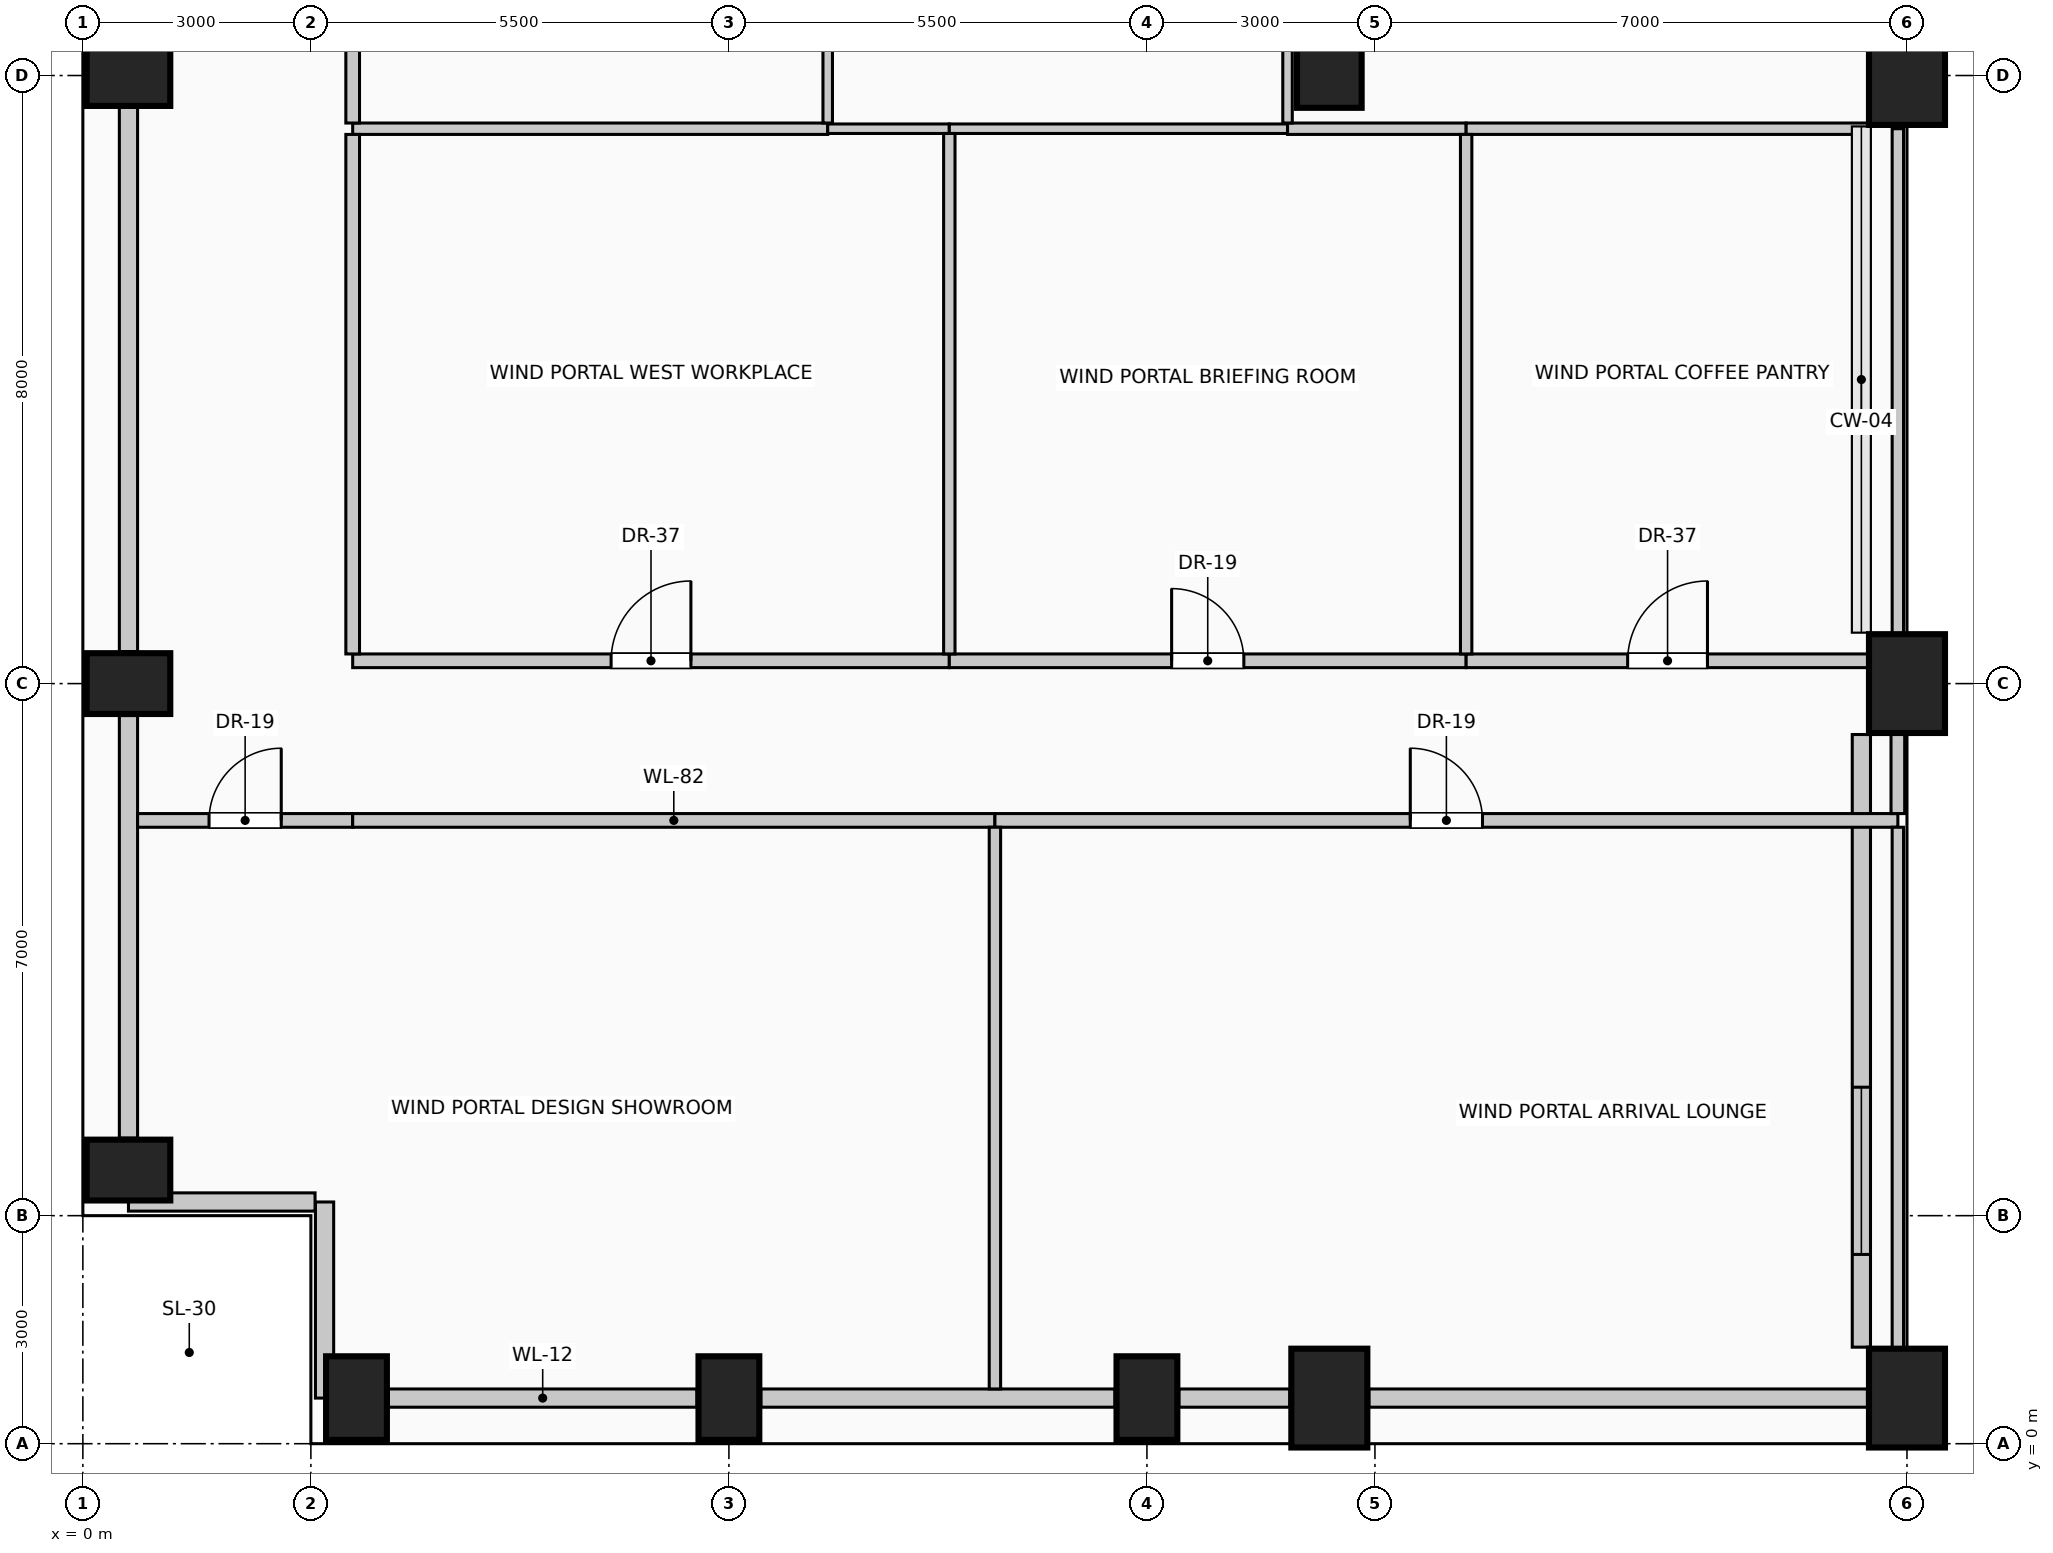
"""IFC4 building model, lengths in metres.
Left out: names, types, materials, properties, quantities, classifications, styles, units other than length and angle.
Written with IfcOpenShell. Run it as: python <this file> out.ifc"""

import sys

from ifc_helpers import new_model, si_unit, direction, frame, frame_2d, origin, origin_2d, place, context, subcontext, project, spatial, rectangle, circle, extrude, element, fill, save


model = new_model("IFC4")
c1 = context("Model", 3, precision=1e-05, world=origin(), true_north=direction((0.0, 1.0)))
c2 = subcontext(c1, "Body", "Model", "MODEL_VIEW")
j1 = project(units=[si_unit("LENGTHUNIT", "METRE"), si_unit("PLANEANGLEUNIT", "RADIAN")], contexts=[c1])
p1 = place(None, origin())
s1 = spatial("IfcSite", under=j1, at=p1, CompositionType="ELEMENT")
p2 = place(p1, origin())
s2 = spatial("IfcBuilding", under=s1, at=p2, CompositionType="ELEMENT")
p3 = place(p2, frame((0.0, 0.0, 190.6)))
s3 = spatial("IfcBuildingStorey", under=s2, at=p3, CompositionType="ELEMENT", Elevation=190.6)
for number, where, z_axis, x_axis in (
    (1, (3.6, 0.6, 0.0), (0.0, 0.0, 1.0), (1.0, 0.0, 0.0)),
    (2, (8.5, 0.6, 0.0), (0.0, 0.0, 1.0), (1.0, 0.0, 0.0)),
    (3, (14.0, 0.6, 0.0), (0.0, 0.0, 1.0), (1.0, 0.0, 0.0)),
):
    element("IfcColumn", number, at=place(p3, frame(where, z_axis=z_axis, x_axis=x_axis)), inside=s3, PredefinedType="COLUMN", context=c2, shape_type="SweptSolid", body=[
        extrude(rectangle(XDim=0.8, YDim=1.1, at=origin_2d()), origin(), (0.0, 0.0, 1.0), 4.0),
    ])
for number, where, z_axis, x_axis in (
    (4, (16.4, 0.6, 0.0), (0.0, 0.0, 1.0), (1.0, 0.0, 0.0)),
    (5, (24.0, 0.6, 0.0), (0.0, 0.0, 1.0), (1.0, 0.0, 0.0)),
):
    element("IfcColumn", number, at=place(p3, frame(where, z_axis=z_axis, x_axis=x_axis)), inside=s3, PredefinedType="COLUMN", context=c2, shape_type="SweptSolid", body=[
        extrude(rectangle(XDim=1.0, YDim=1.3, at=origin_2d()), origin(), (0.0, 0.0, 1.0), 4.0),
    ])
for number, where, z_axis, x_axis in (
    (6, (0.6, 3.6, 0.0), (0.0, 0.0, 1.0), (0.0, 1.0, 0.0)),
    (7, (0.6, 10.0, 0.0), (0.0, 0.0, 1.0), (0.0, 1.0, 0.0)),
    (8, (0.6, 18.0, 0.0), (0.0, 0.0, 1.0), (0.0, 1.0, 0.0)),
):
    element("IfcColumn", number, at=place(p3, frame(where, z_axis=z_axis, x_axis=x_axis)), inside=s3, PredefinedType="COLUMN", context=c2, shape_type="SweptSolid", body=[
        extrude(rectangle(XDim=0.8, YDim=1.1, at=origin_2d()), origin(), (0.0, 0.0, 1.0), 4.0),
    ])
for number, where, z_axis, x_axis in (
    (9, (24.0, 10.0, 0.0), (0.0, 0.0, 1.0), (1.0, 0.0, 0.0)),
    (10, (24.0, 18.0, 0.0), (0.0, 0.0, 1.0), (1.0, 0.0, 0.0)),
):
    element("IfcColumn", number, at=place(p3, frame(where, z_axis=z_axis, x_axis=x_axis)), inside=s3, PredefinedType="COLUMN", context=c2, shape_type="SweptSolid", body=[
        extrude(rectangle(XDim=1.0, YDim=1.3, at=origin_2d()), origin(), (0.0, 0.0, 1.0), 4.0),
    ])
p4 = place(p3, frame((16.4, 18.0, 0.0), z_axis=(0.0, 0.0, 1.0), x_axis=(1.0, 0.0, 0.0)))
e11 = element("IfcColumn", 11, at=p4, inside=s3, PredefinedType="COLUMN", context=c2, shape_type="SweptSolid", body=[
    extrude(circle(Radius=0.425, at=origin_2d()), origin(), (0.0, 0.0, 1.0), 4.0),
])
p5 = place(p3, frame((8.08, 0.6, 0.0), z_axis=(0.0, 0.0, 1.0), x_axis=(-1.0, 0.0, 0.0)))
e12 = element("IfcWall", 12, at=p5, inside=s3, PredefinedType="SOLIDWALL", context=c2, shape_type="SweptSolid", body=[
    extrude(rectangle(XDim=4.06, YDim=0.24, at=frame_2d((2.03, 0.0))), origin(), (0.0, 0.0, 1.0), 3.0),
])
p6 = place(p3, frame((13.58, 0.6, 0.0), z_axis=(0.0, 0.0, 1.0), x_axis=(-1.0, 0.0, 0.0)))
e13 = element("IfcWall", 13, at=p6, inside=s3, PredefinedType="SOLIDWALL", context=c2, shape_type="SweptSolid", body=[
    extrude(rectangle(XDim=4.66, YDim=0.24, at=frame_2d((2.33, 0.0))), origin(), (0.0, 0.0, 1.0), 3.0),
])
p7 = place(p3, frame((15.88, 0.6, 0.0), z_axis=(0.0, 0.0, 1.0), x_axis=(-1.0, 0.0, 0.0)))
e14 = element("IfcWall", 14, at=p7, inside=s3, PredefinedType="SOLIDWALL", context=c2, shape_type="SweptSolid", body=[
    extrude(rectangle(XDim=1.46, YDim=0.24, at=frame_2d((0.73, 0.0))), origin(), (0.0, 0.0, 1.0), 3.0),
])
p8 = place(p3, frame((23.48, 0.6, 0.0), z_axis=(0.0, 0.0, 1.0), x_axis=(-1.0, 0.0, 0.0)))
e15 = element("IfcWall", 15, at=p8, inside=s3, PredefinedType="SOLIDWALL", context=c2, shape_type="SweptSolid", body=[
    extrude(rectangle(XDim=6.56, YDim=0.24, at=frame_2d((3.28, 0.0))), origin(), (0.0, 0.0, 1.0), 3.0),
])
p9 = place(p3, frame((0.6, 4.02, 0.0), z_axis=(0.0, 0.0, 1.0), x_axis=(0.0, 1.0, 0.0)))
e16 = element("IfcWall", 16, at=p9, inside=s3, PredefinedType="SOLIDWALL", context=c2, shape_type="SweptSolid", body=[
    extrude(rectangle(XDim=5.56, YDim=0.24, at=frame_2d((2.78, 0.0))), origin(), (0.0, 0.0, 1.0), 3.0),
])
p10 = place(p3, frame((0.6, 10.42, 0.0), z_axis=(0.0, 0.0, 1.0), x_axis=(0.0, 1.0, 0.0)))
e17 = element("IfcWall", 17, at=p10, inside=s3, PredefinedType="SOLIDWALL", context=c2, shape_type="SweptSolid", body=[
    extrude(rectangle(XDim=7.16, YDim=0.24, at=frame_2d((3.58, 0.0))), origin(), (0.0, 0.0, 1.0), 3.0),
])
p11 = place(p3, frame((3.18, 0.6, 0.0), z_axis=(0.0, 0.0, 1.0), x_axis=(0.0, 1.0, 0.0)))
e18 = element("IfcWall", 18, at=p11, inside=s3, PredefinedType="SOLIDWALL", context=c2, shape_type="SweptSolid", body=[
    extrude(rectangle(XDim=2.58, YDim=0.24, at=frame_2d((1.29, 0.0))), origin(), (0.0, 0.0, 1.0), 3.75),
])
p12 = place(p3, frame((3.055, 3.18, 0.0), z_axis=(0.0, 0.0, 1.0), x_axis=(-1.0, 0.0, 0.0)))
e19 = element("IfcWall", 19, at=p12, inside=s3, PredefinedType="SOLIDWALL", context=c2, shape_type="SweptSolid", body=[
    extrude(rectangle(XDim=2.455, YDim=0.24, at=frame_2d((1.228, 0.0))), origin(), (0.0, 0.0, 1.0), 3.75),
])
p13 = place(p3, frame((23.4, 9.33, 0.0), z_axis=(0.0, 0.0, 1.0), x_axis=(0.0, -1.0, 0.0)))
e20 = element("IfcWall", 20, at=p13, inside=s3, PredefinedType="SOLIDWALL", context=c2, shape_type="SweptSolid", body=[
    extrude(rectangle(XDim=8.06, YDim=0.24, at=frame_2d((4.03, 0.0))), origin(), (0.0, 0.0, 1.0), 3.75),
])
p14 = place(p13, frame((4.64, 0.0, 0.42)))
e21 = element("IfcOpeningElement", 21, at=p14, cuts=e20, PredefinedType="OPENING", context=c2, shape_type="SweptSolid", body=[
    extrude(rectangle(XDim=2.2, YDim=1.95, at=frame_2d((1.1, 0.975))), frame((0.0, 0.13, 0.0), z_axis=(0.0, -1.0, 0.0), x_axis=(1.0, 0.0, 0.0)), (0.0, 0.0, 1.0), 0.26),
])
p15 = place(p3, frame((0.72, 8.2, 0.0), z_axis=(0.0, 0.0, 1.0), x_axis=(1.0, 0.0, 0.0)))
e22 = element("IfcWall", 22, at=p15, inside=s3, PredefinedType="PARTITIONING", context=c2, shape_type="SweptSolid", body=[
    extrude(rectangle(XDim=2.83, YDim=0.18, at=frame_2d((1.415, 0.0))), origin(), (0.0, 0.0, 1.0), 3.75),
])
p16 = place(p15, frame((0.94, 0.0, 0.0)))
e23 = element("IfcOpeningElement", 23, at=p16, cuts=e22, PredefinedType="OPENING", context=c2, shape_type="SweptSolid", body=[
    extrude(rectangle(XDim=0.95, YDim=2.15, at=frame_2d((0.475, 1.075))), frame((0.0, 0.1, 0.0), z_axis=(0.0, -1.0, 0.0), x_axis=(1.0, 0.0, 0.0)), (0.0, 0.0, 1.0), 0.2),
])
p17 = place(p3, frame((3.55, 8.2, 0.0), z_axis=(0.0, 0.0, 1.0), x_axis=(1.0, 0.0, 0.0)))
e24 = element("IfcWall", 24, at=p17, inside=s3, PredefinedType="PARTITIONING", context=c2, shape_type="SweptSolid", body=[
    extrude(rectangle(XDim=8.45, YDim=0.18, at=frame_2d((4.225, 0.0))), origin(), (0.0, 0.0, 1.0), 3.75),
])
p18 = place(p3, frame((12.0, 8.2, 0.0), z_axis=(0.0, 0.0, 1.0), x_axis=(1.0, 0.0, 0.0)))
e25 = element("IfcWall", 25, at=p18, inside=s3, PredefinedType="PARTITIONING", context=c2, shape_type="SweptSolid", body=[
    extrude(rectangle(XDim=11.88, YDim=0.18, at=frame_2d((5.94, 0.0))), origin(), (0.0, 0.0, 1.0), 3.75),
])
p19 = place(p18, frame((5.465, 0.0, 0.0)))
e26 = element("IfcOpeningElement", 26, at=p19, cuts=e25, PredefinedType="OPENING", context=c2, shape_type="SweptSolid", body=[
    extrude(rectangle(XDim=0.95, YDim=2.15, at=frame_2d((0.475, 1.075))), frame((0.0, 0.1, 0.0), z_axis=(0.0, -1.0, 0.0), x_axis=(1.0, 0.0, 0.0)), (0.0, 0.0, 1.0), 0.2),
])
p20 = place(p3, frame((3.55, 10.3, 0.0), z_axis=(0.0, 0.0, 1.0), x_axis=(1.0, 0.0, 0.0)))
e27 = element("IfcWall", 27, at=p20, inside=s3, PredefinedType="PARTITIONING", context=c2, shape_type="SweptSolid", body=[
    extrude(rectangle(XDim=7.85, YDim=0.18, at=frame_2d((3.925, 0.0))), origin(), (0.0, 0.0, 1.0), 3.75),
])
p21 = place(p20, frame((3.4, 0.0, 0.0)))
e28 = element("IfcOpeningElement", 28, at=p21, cuts=e27, PredefinedType="OPENING", context=c2, shape_type="SweptSolid", body=[
    extrude(rectangle(XDim=1.05, YDim=2.15, at=frame_2d((0.525, 1.075))), frame((0.0, 0.1, 0.0), z_axis=(0.0, -1.0, 0.0), x_axis=(1.0, 0.0, 0.0)), (0.0, 0.0, 1.0), 0.2),
])
p22 = place(p3, frame((11.4, 10.3, 0.0), z_axis=(0.0, 0.0, 1.0), x_axis=(1.0, 0.0, 0.0)))
e29 = element("IfcWall", 29, at=p22, inside=s3, PredefinedType="PARTITIONING", context=c2, shape_type="SweptSolid", body=[
    extrude(rectangle(XDim=6.8, YDim=0.18, at=frame_2d((3.4, 0.0))), origin(), (0.0, 0.0, 1.0), 3.75),
])
p23 = place(p22, frame((2.925, 0.0, 0.0)))
e30 = element("IfcOpeningElement", 30, at=p23, cuts=e29, PredefinedType="OPENING", context=c2, shape_type="SweptSolid", body=[
    extrude(rectangle(XDim=0.95, YDim=2.15, at=frame_2d((0.475, 1.075))), frame((0.0, 0.1, 0.0), z_axis=(0.0, -1.0, 0.0), x_axis=(1.0, 0.0, 0.0)), (0.0, 0.0, 1.0), 0.2),
])
p24 = place(p3, frame((18.2, 10.3, 0.0), z_axis=(0.0, 0.0, 1.0), x_axis=(1.0, 0.0, 0.0)))
e31 = element("IfcWall", 31, at=p24, inside=s3, PredefinedType="PARTITIONING", context=c2, shape_type="SweptSolid", body=[
    extrude(rectangle(XDim=5.3, YDim=0.18, at=frame_2d((2.65, 0.0))), origin(), (0.0, 0.0, 1.0), 3.75),
])
p25 = place(p24, frame((2.125, 0.0, 0.0)))
e32 = element("IfcOpeningElement", 32, at=p25, cuts=e31, PredefinedType="OPENING", context=c2, shape_type="SweptSolid", body=[
    extrude(rectangle(XDim=1.05, YDim=2.15, at=frame_2d((0.525, 1.075))), frame((0.0, 0.1, 0.0), z_axis=(0.0, -1.0, 0.0), x_axis=(1.0, 0.0, 0.0)), (0.0, 0.0, 1.0), 0.2),
])
p26 = place(p3, frame((3.55, 17.3, 0.0), z_axis=(0.0, 0.0, 1.0), x_axis=(1.0, 0.0, 0.0)))
e33 = element("IfcWall", 33, at=p26, inside=s3, PredefinedType="PARTITIONING", context=c2, shape_type="SweptSolid", body=[
    extrude(rectangle(XDim=6.25, YDim=0.15, at=frame_2d((3.125, 0.0))), origin(), (0.0, 0.0, 1.0), 3.75),
])
p27 = place(p3, frame((9.8, 17.3, 0.0), z_axis=(0.0, 0.0, 1.0), x_axis=(1.0, 0.0, 0.0)))
e34 = element("IfcWall", 34, at=p27, inside=s3, PredefinedType="PARTITIONING", context=c2, shape_type="SweptSolid", body=[
    extrude(rectangle(XDim=1.6, YDim=0.125, at=frame_2d((0.8, 0.0))), origin(), (0.0, 0.0, 1.0), 3.75),
])
p28 = place(p3, frame((11.4, 17.3, 0.0), z_axis=(0.0, 0.0, 1.0), x_axis=(1.0, 0.0, 0.0)))
e35 = element("IfcWall", 35, at=p28, inside=s3, PredefinedType="PARTITIONING", context=c2, shape_type="SweptSolid", body=[
    extrude(rectangle(XDim=4.45, YDim=0.125, at=frame_2d((2.225, 0.0))), origin(), (0.0, 0.0, 1.0), 3.75),
])
p29 = place(p3, frame((15.85, 17.3, 0.0), z_axis=(0.0, 0.0, 1.0), x_axis=(1.0, 0.0, 0.0)))
e36 = element("IfcWall", 36, at=p29, inside=s3, PredefinedType="PARTITIONING", context=c2, shape_type="SweptSolid", body=[
    extrude(rectangle(XDim=2.35, YDim=0.15, at=frame_2d((1.175, 0.0))), origin(), (0.0, 0.0, 1.0), 3.75),
])
p30 = place(p3, frame((18.2, 17.3, 0.0), z_axis=(0.0, 0.0, 1.0), x_axis=(1.0, 0.0, 0.0)))
e37 = element("IfcWall", 37, at=p30, inside=s3, PredefinedType="PARTITIONING", context=c2, shape_type="SweptSolid", body=[
    extrude(rectangle(XDim=5.3, YDim=0.15, at=frame_2d((2.65, 0.0))), origin(), (0.0, 0.0, 1.0), 3.75),
])
p31 = place(p3, frame((3.55, 10.39, 0.0), z_axis=(0.0, 0.0, 1.0), x_axis=(0.0, 1.0, 0.0)))
e38 = element("IfcWall", 38, at=p31, inside=s3, PredefinedType="PARTITIONING", context=c2, shape_type="SweptSolid", body=[
    extrude(rectangle(XDim=6.835, YDim=0.18, at=frame_2d((3.417, 0.0))), origin(), (0.0, 0.0, 1.0), 3.75),
])
p32 = place(p3, frame((3.55, 17.375, 0.0), z_axis=(0.0, 0.0, 1.0), x_axis=(0.0, 1.0, 0.0)))
e39 = element("IfcWall", 39, at=p32, inside=s3, PredefinedType="PARTITIONING", context=c2, shape_type="SweptSolid", body=[
    extrude(rectangle(XDim=7.35, YDim=0.18, at=frame_2d((3.675, 0.0))), origin(), (0.0, 0.0, 1.0), 3.75),
])
p33 = place(p3, frame((9.8, 17.375, 0.0), z_axis=(0.0, 0.0, 1.0), x_axis=(0.0, 1.0, 0.0)))
e40 = element("IfcWall", 40, at=p33, inside=s3, PredefinedType="PARTITIONING", context=c2, shape_type="SweptSolid", body=[
    extrude(rectangle(XDim=7.35, YDim=0.125, at=frame_2d((3.675, 0.0))), origin(), (0.0, 0.0, 1.0), 3.75),
])
p34 = place(p3, frame((11.4, 10.39, 0.0), z_axis=(0.0, 0.0, 1.0), x_axis=(0.0, 1.0, 0.0)))
e41 = element("IfcWall", 41, at=p34, inside=s3, PredefinedType="PARTITIONING", context=c2, shape_type="SweptSolid", body=[
    extrude(rectangle(XDim=6.848, YDim=0.15, at=frame_2d((3.424, 0.0))), origin(), (0.0, 0.0, 1.0), 3.75),
])
p35 = place(p3, frame((12.0, 0.72, 0.0), z_axis=(0.0, 0.0, 1.0), x_axis=(0.0, 1.0, 0.0)))
e42 = element("IfcWall", 42, at=p35, inside=s3, PredefinedType="PARTITIONING", context=c2, shape_type="SweptSolid", body=[
    extrude(rectangle(XDim=7.39, YDim=0.15, at=frame_2d((3.695, 0.0))), origin(), (0.0, 0.0, 1.0), 3.75),
])
p36 = place(p3, frame((15.85, 17.375, 0.0), z_axis=(0.0, 0.0, 1.0), x_axis=(0.0, 1.0, 0.0)))
e43 = element("IfcWall", 43, at=p36, inside=s3, PredefinedType="PARTITIONING", context=c2, shape_type="SweptSolid", body=[
    extrude(rectangle(XDim=7.35, YDim=0.125, at=frame_2d((3.675, 0.0))), origin(), (0.0, 0.0, 1.0), 3.75),
])
p37 = place(p3, frame((18.2, 10.39, 0.0), z_axis=(0.0, 0.0, 1.0), x_axis=(0.0, 1.0, 0.0)))
e44 = element("IfcWall", 44, at=p37, inside=s3, PredefinedType="PARTITIONING", context=c2, shape_type="SweptSolid", body=[
    extrude(rectangle(XDim=6.835, YDim=0.15, at=frame_2d((3.417, 0.0))), origin(), (0.0, 0.0, 1.0), 3.75),
])
p38 = place(p3, frame((23.88, 1.25, 0.0), z_axis=(0.0, 0.0, 1.0), x_axis=(0.0, 1.0, 0.0)))
e45 = element("IfcWall", 45, at=p38, inside=s3, PredefinedType="PARTITIONING", context=c2, shape_type="SweptSolid", body=[
    extrude(rectangle(XDim=6.86, YDim=0.15, at=frame_2d((3.43, 0.0))), origin(), (0.0, 0.0, 1.0), 3.145),
])
p39 = place(p3, frame((23.88, 8.29, 0.0), z_axis=(0.0, 0.0, 1.0), x_axis=(0.0, 1.0, 0.0)))
e46 = element("IfcWall", 46, at=p39, inside=s3, PredefinedType="PARTITIONING", context=c2, shape_type="SweptSolid", body=[
    extrude(rectangle(XDim=1.06, YDim=0.18, at=frame_2d((0.53, 0.0))), origin(), (0.0, 0.0, 1.0), 3.145),
])
p40 = place(p3, frame((23.88, 10.65, 0.0), z_axis=(0.0, 0.0, 1.0), x_axis=(0.0, 1.0, 0.0)))
e47 = element("IfcWall", 47, at=p40, inside=s3, PredefinedType="PARTITIONING", context=c2, shape_type="SweptSolid", body=[
    extrude(rectangle(XDim=6.65, YDim=0.15, at=frame_2d((3.325, 0.0))), origin(), (0.0, 0.0, 1.0), 3.145),
])
p41 = place(p14, origin())
e48 = element("IfcWindow", 48, at=p41, inside=s3, PartitioningType="SINGLE_PANEL", PredefinedType="WINDOW", context=c2, shape_type="SweptSolid", body=[
    extrude(rectangle(XDim=2.2, YDim=1.95, at=frame_2d((1.1, 0.975))), frame((0.0, 0.03, 0.0), z_axis=(0.0, -1.0, 0.0), x_axis=(1.0, 0.0, 0.0)), (0.0, 0.0, 1.0), 0.06),
])
fill(e21, e48)
p42 = place(p16, origin())
e49 = element("IfcDoor", 49, at=p42, inside=s3, OperationType="SINGLE_SWING_RIGHT", PredefinedType="DOOR", context=c2, shape_type="SweptSolid", body=[
    extrude(rectangle(XDim=0.95, YDim=2.15, at=frame_2d((0.475, 1.075))), frame((0.0, 0.025, 0.0), z_axis=(0.0, -1.0, 0.0), x_axis=(1.0, 0.0, 0.0)), (0.0, 0.0, 1.0), 0.05),
])
fill(e23, e49)
p43 = place(p19, origin())
e50 = element("IfcDoor", 50, at=p43, inside=s3, OperationType="SINGLE_SWING_LEFT", PredefinedType="DOOR", context=c2, shape_type="SweptSolid", body=[
    extrude(rectangle(XDim=0.95, YDim=2.15, at=frame_2d((0.475, 1.075))), frame((0.0, 0.025, 0.0), z_axis=(0.0, -1.0, 0.0), x_axis=(1.0, 0.0, 0.0)), (0.0, 0.0, 1.0), 0.05),
])
fill(e26, e50)
p44 = place(p21, origin())
e51 = element("IfcDoor", 51, at=p44, inside=s3, OperationType="SINGLE_SWING_RIGHT", PredefinedType="DOOR", context=c2, shape_type="SweptSolid", body=[
    extrude(rectangle(XDim=1.05, YDim=2.15, at=frame_2d((0.525, 1.075))), frame((0.0, 0.025, 0.0), z_axis=(0.0, -1.0, 0.0), x_axis=(1.0, 0.0, 0.0)), (0.0, 0.0, 1.0), 0.05),
])
fill(e28, e51)
p45 = place(p23, origin())
e52 = element("IfcDoor", 52, at=p45, inside=s3, OperationType="SINGLE_SWING_LEFT", PredefinedType="DOOR", context=c2, shape_type="SweptSolid", body=[
    extrude(rectangle(XDim=0.95, YDim=2.15, at=frame_2d((0.475, 1.075))), frame((0.0, 0.025, 0.0), z_axis=(0.0, -1.0, 0.0), x_axis=(1.0, 0.0, 0.0)), (0.0, 0.0, 1.0), 0.05),
])
fill(e30, e52)
p46 = place(p25, origin())
e53 = element("IfcDoor", 53, at=p46, inside=s3, OperationType="SINGLE_SWING_RIGHT", PredefinedType="DOOR", context=c2, shape_type="SweptSolid", body=[
    extrude(rectangle(XDim=1.05, YDim=2.15, at=frame_2d((0.525, 1.075))), frame((0.0, 0.025, 0.0), z_axis=(0.0, -1.0, 0.0), x_axis=(1.0, 0.0, 0.0)), (0.0, 0.0, 1.0), 0.05),
])
fill(e32, e53)
save(model, sys.argv[1])
